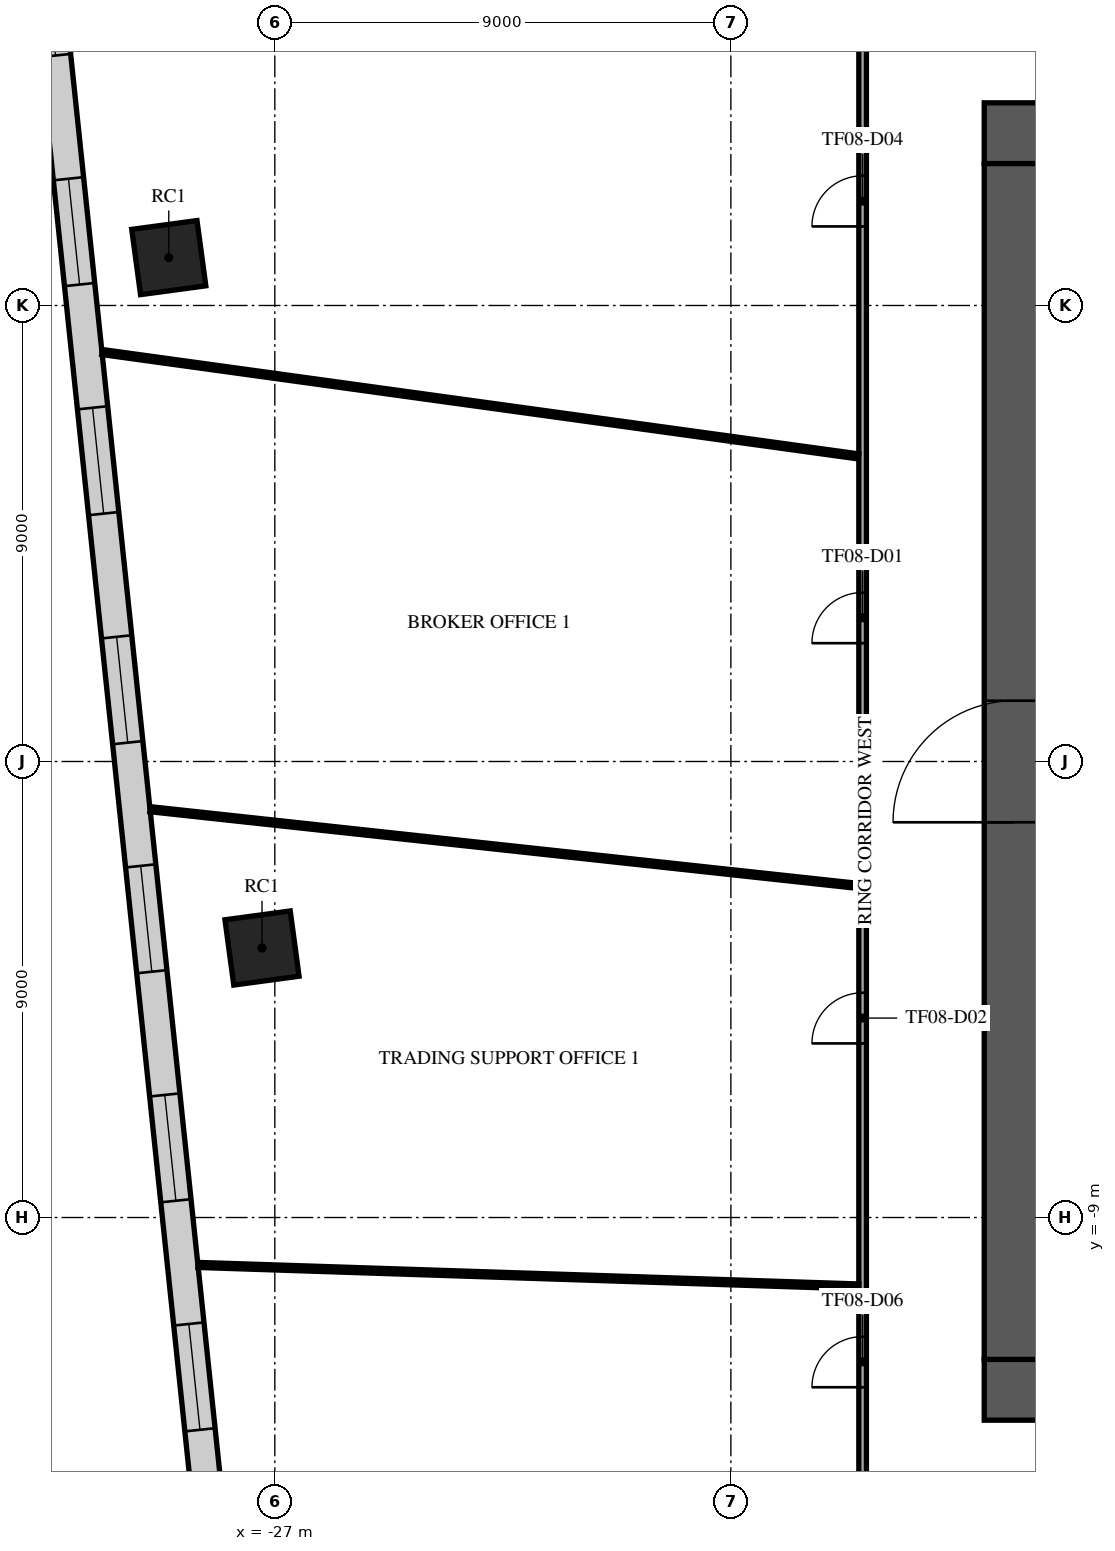
"""IFC4 building model, lengths in metres.
Left out: names, types, materials, properties, quantities, classifications, styles, units other than length and angle.
Written with IfcOpenShell. Run it as: python <this file> out.ifc"""

import sys

from ifc_helpers import new_model, si_unit, direction, frame, frame_2d, origin, origin_2d, place, context, subcontext, project, spatial, rectangle, extrude, element, fill, save


model = new_model("IFC4")
c1 = context("Model", 3, precision=1e-05, world=origin(), true_north=direction((0.0, 1.0)))
c2 = subcontext(c1, "Body", "Model", "MODEL_VIEW")
j1 = project(units=[si_unit("LENGTHUNIT", "METRE"), si_unit("PLANEANGLEUNIT", "RADIAN")], contexts=[c1])
p1 = place(None, origin())
s1 = spatial("IfcSite", under=j1, at=p1, CompositionType="ELEMENT")
p2 = place(p1, origin())
s2 = spatial("IfcBuilding", under=s1, at=p2, CompositionType="ELEMENT")
p3 = place(p2, frame((0.0, 0.0, 36.9)))
s3 = spatial("IfcBuildingStorey", under=s2, at=p3, CompositionType="ELEMENT", Elevation=36.9)
for number, where, z_axis, x_axis in (
    (1, (-29.093, 9.945, 0.0), (0.0, 0.0, 1.0), (0.991, 0.134, 0.0)),
    (2, (-27.253, -3.681, 0.0), (0.0, 0.0, 1.0), (0.991, 0.134, 0.0)),
):
    element("IfcColumn", number, at=place(p3, frame(where, z_axis=z_axis, x_axis=x_axis)), inside=s3, PredefinedType="COLUMN", context=c2, shape_type="SweptSolid", body=[
        extrude(rectangle(XDim=1.3, YDim=1.3, at=origin_2d()), origin(), (0.0, 0.0, 1.0), 4.8),
    ])
p4 = place(p3, frame((-13.0, 12.4, 0.0), z_axis=(0.0, 0.0, 1.0), x_axis=(1.0, 0.0, 0.0)))
e3 = element("IfcWall", 3, at=p4, inside=s3, PredefinedType="SHEAR", context=c2, shape_type="SweptSolid", body=[
    extrude(rectangle(XDim=26.0, YDim=1.2, at=frame_2d((13.0, 0.0))), origin(), (0.0, 0.0, 1.0), 4.35),
])
p5 = place(p4, frame((11.8, 0.0, 0.0)))
e4 = element("IfcOpeningElement", 4, at=p5, cuts=e3, PredefinedType="OPENING", context=c2, shape_type="SweptSolid", body=[
    extrude(rectangle(XDim=2.4, YDim=2.4, at=frame_2d((1.2, 1.2))), frame((0.0, 0.61, 0.0), z_axis=(0.0, -1.0, 0.0), x_axis=(1.0, 0.0, 0.0)), (0.0, 0.0, 1.0), 1.22),
])
p6 = place(p4, frame((22.625, 0.0, 0.0)))
e5 = element("IfcOpeningElement", 5, at=p6, cuts=e3, PredefinedType="OPENING", context=c2, shape_type="SweptSolid", body=[
    extrude(rectangle(XDim=1.2, YDim=2.1, at=frame_2d((0.6, 1.05))), frame((0.0, 0.61, 0.0), z_axis=(0.0, -1.0, 0.0), x_axis=(1.0, 0.0, 0.0)), (0.0, 0.0, 1.0), 1.22),
])
p7 = place(p4, frame((1.6, 0.0, 0.0)))
e6 = element("IfcOpeningElement", 6, at=p7, cuts=e3, PredefinedType="OPENING", context=c2, shape_type="SweptSolid", body=[
    extrude(rectangle(XDim=1.0, YDim=2.1, at=frame_2d((0.5, 1.05))), frame((0.0, 0.61, 0.0), z_axis=(0.0, -1.0, 0.0), x_axis=(1.0, 0.0, 0.0)), (0.0, 0.0, 1.0), 1.22),
])
p8 = place(p3, frame((-13.0, -12.4, 0.0), z_axis=(0.0, 0.0, 1.0), x_axis=(1.0, 0.0, 0.0)))
e7 = element("IfcWall", 7, at=p8, inside=s3, PredefinedType="SHEAR", context=c2, shape_type="SweptSolid", body=[
    extrude(rectangle(XDim=26.0, YDim=1.2, at=frame_2d((13.0, 0.0))), origin(), (0.0, 0.0, 1.0), 4.35),
])
p9 = place(p8, frame((7.9, 0.0, 0.0)))
e8 = element("IfcOpeningElement", 8, at=p9, cuts=e7, PredefinedType="OPENING", context=c2, shape_type="SweptSolid", body=[
    extrude(rectangle(XDim=2.0, YDim=2.1, at=frame_2d((1.0, 1.05))), frame((0.0, 0.61, 0.0), z_axis=(0.0, -1.0, 0.0), x_axis=(1.0, 0.0, 0.0)), (0.0, 0.0, 1.0), 1.22),
])
p10 = place(p8, frame((18.025, 0.0, 0.0)))
e9 = element("IfcOpeningElement", 9, at=p10, cuts=e7, PredefinedType="OPENING", context=c2, shape_type="SweptSolid", body=[
    extrude(rectangle(XDim=1.2, YDim=2.1, at=frame_2d((0.6, 1.05))), frame((0.0, 0.61, 0.0), z_axis=(0.0, -1.0, 0.0), x_axis=(1.0, 0.0, 0.0)), (0.0, 0.0, 1.0), 1.22),
])
p11 = place(p8, frame((2.175, 0.0, 0.0)))
e10 = element("IfcOpeningElement", 10, at=p11, cuts=e7, PredefinedType="OPENING", context=c2, shape_type="SweptSolid", body=[
    extrude(rectangle(XDim=1.2, YDim=2.1, at=frame_2d((0.6, 1.05))), frame((0.0, 0.61, 0.0), z_axis=(0.0, -1.0, 0.0), x_axis=(1.0, 0.0, 0.0)), (0.0, 0.0, 1.0), 1.22),
])
p12 = place(p8, frame((22.625, 0.0, 0.0)))
e11 = element("IfcOpeningElement", 11, at=p12, cuts=e7, PredefinedType="OPENING", context=c2, shape_type="SweptSolid", body=[
    extrude(rectangle(XDim=1.2, YDim=2.1, at=frame_2d((0.6, 1.05))), frame((0.0, 0.61, 0.0), z_axis=(0.0, -1.0, 0.0), x_axis=(1.0, 0.0, 0.0)), (0.0, 0.0, 1.0), 1.22),
])
p13 = place(p3, frame((-12.4, -11.8, 0.0), z_axis=(0.0, 0.0, 1.0), x_axis=(0.0, 1.0, 0.0)))
e12 = element("IfcWall", 12, at=p13, inside=s3, PredefinedType="SHEAR", context=c2, shape_type="SweptSolid", body=[
    extrude(rectangle(XDim=23.6, YDim=1.2, at=frame_2d((11.8, 0.0))), origin(), (0.0, 0.0, 1.0), 4.35),
])
p14 = place(p13, frame((10.6, 0.0, 0.0)))
e13 = element("IfcOpeningElement", 13, at=p14, cuts=e12, PredefinedType="OPENING", context=c2, shape_type="SweptSolid", body=[
    extrude(rectangle(XDim=2.4, YDim=2.4, at=frame_2d((1.2, 1.2))), frame((0.0, 0.61, 0.0), z_axis=(0.0, -1.0, 0.0), x_axis=(1.0, 0.0, 0.0)), (0.0, 0.0, 1.0), 1.22),
])
p15 = place(p3, frame((-32.137, 21.635, 0.0), z_axis=(0.0, 0.0, 1.0), x_axis=(0.104528196591, -0.994521923397, 0.0)))
e14 = element("IfcWall", 14, at=p15, inside=s3, PredefinedType="STANDARD", context=c2, shape_type="SweptSolid", body=[
    extrude(rectangle(XDim=49.751, YDim=0.6, at=frame_2d((24.876, 0.0))), origin(), (0.0, 0.0, 1.0), 4.35),
])
p16 = place(p15, frame((1.161, 0.0, 0.9)))
e15 = element("IfcOpeningElement", 15, at=p16, cuts=e14, PredefinedType="OPENING", context=c2, shape_type="SweptSolid", body=[
    extrude(rectangle(XDim=2.1, YDim=2.7, at=frame_2d((1.05, 1.35))), frame((0.0, 0.31, 0.0), z_axis=(0.0, -1.0, 0.0), x_axis=(1.0, 0.0, 0.0)), (0.0, 0.0, 1.0), 0.62),
])
p17 = place(p15, frame((5.644, 0.0, 0.9)))
e16 = element("IfcOpeningElement", 16, at=p17, cuts=e14, PredefinedType="OPENING", context=c2, shape_type="SweptSolid", body=[
    extrude(rectangle(XDim=2.1, YDim=2.7, at=frame_2d((1.05, 1.35))), frame((0.0, 0.31, 0.0), z_axis=(0.0, -1.0, 0.0), x_axis=(1.0, 0.0, 0.0)), (0.0, 0.0, 1.0), 0.62),
])
p18 = place(p15, frame((10.189, 0.0, 0.9)))
e17 = element("IfcOpeningElement", 17, at=p18, cuts=e14, PredefinedType="OPENING", context=c2, shape_type="SweptSolid", body=[
    extrude(rectangle(XDim=2.1, YDim=2.7, at=frame_2d((1.05, 1.35))), frame((0.0, 0.31, 0.0), z_axis=(0.0, -1.0, 0.0), x_axis=(1.0, 0.0, 0.0)), (0.0, 0.0, 1.0), 0.62),
])
p19 = place(p15, frame((14.735, 0.0, 0.9)))
e18 = element("IfcOpeningElement", 18, at=p19, cuts=e14, PredefinedType="OPENING", context=c2, shape_type="SweptSolid", body=[
    extrude(rectangle(XDim=2.1, YDim=2.7, at=frame_2d((1.05, 1.35))), frame((0.0, 0.31, 0.0), z_axis=(0.0, -1.0, 0.0), x_axis=(1.0, 0.0, 0.0)), (0.0, 0.0, 1.0), 0.62),
])
p20 = place(p15, frame((19.28, 0.0, 0.9)))
e19 = element("IfcOpeningElement", 19, at=p20, cuts=e14, PredefinedType="OPENING", context=c2, shape_type="SweptSolid", body=[
    extrude(rectangle(XDim=2.1, YDim=2.7, at=frame_2d((1.05, 1.35))), frame((0.0, 0.31, 0.0), z_axis=(0.0, -1.0, 0.0), x_axis=(1.0, 0.0, 0.0)), (0.0, 0.0, 1.0), 0.62),
])
p21 = place(p15, frame((23.826, 0.0, 0.9)))
e20 = element("IfcOpeningElement", 20, at=p21, cuts=e14, PredefinedType="OPENING", context=c2, shape_type="SweptSolid", body=[
    extrude(rectangle(XDim=2.1, YDim=2.7, at=frame_2d((1.05, 1.35))), frame((0.0, 0.31, 0.0), z_axis=(0.0, -1.0, 0.0), x_axis=(1.0, 0.0, 0.0)), (0.0, 0.0, 1.0), 0.62),
])
p22 = place(p15, frame((28.371, 0.0, 0.9)))
e21 = element("IfcOpeningElement", 21, at=p22, cuts=e14, PredefinedType="OPENING", context=c2, shape_type="SweptSolid", body=[
    extrude(rectangle(XDim=2.1, YDim=2.7, at=frame_2d((1.05, 1.35))), frame((0.0, 0.31, 0.0), z_axis=(0.0, -1.0, 0.0), x_axis=(1.0, 0.0, 0.0)), (0.0, 0.0, 1.0), 0.62),
])
p23 = place(p15, frame((32.917, 0.0, 0.9)))
e22 = element("IfcOpeningElement", 22, at=p23, cuts=e14, PredefinedType="OPENING", context=c2, shape_type="SweptSolid", body=[
    extrude(rectangle(XDim=2.1, YDim=2.7, at=frame_2d((1.05, 1.35))), frame((0.0, 0.31, 0.0), z_axis=(0.0, -1.0, 0.0), x_axis=(1.0, 0.0, 0.0)), (0.0, 0.0, 1.0), 0.62),
])
p24 = place(p15, frame((37.462, 0.0, 0.9)))
e23 = element("IfcOpeningElement", 23, at=p24, cuts=e14, PredefinedType="OPENING", context=c2, shape_type="SweptSolid", body=[
    extrude(rectangle(XDim=2.1, YDim=2.7, at=frame_2d((1.05, 1.35))), frame((0.0, 0.31, 0.0), z_axis=(0.0, -1.0, 0.0), x_axis=(1.0, 0.0, 0.0)), (0.0, 0.0, 1.0), 0.62),
])
p25 = place(p15, frame((42.008, 0.0, 0.9)))
e24 = element("IfcOpeningElement", 24, at=p25, cuts=e14, PredefinedType="OPENING", context=c2, shape_type="SweptSolid", body=[
    extrude(rectangle(XDim=2.1, YDim=2.7, at=frame_2d((1.05, 1.35))), frame((0.0, 0.31, 0.0), z_axis=(0.0, -1.0, 0.0), x_axis=(1.0, 0.0, 0.0)), (0.0, 0.0, 1.0), 0.62),
])
p26 = place(p15, frame((46.491, 0.0, 0.9)))
e25 = element("IfcOpeningElement", 25, at=p26, cuts=e14, PredefinedType="OPENING", context=c2, shape_type="SweptSolid", body=[
    extrude(rectangle(XDim=2.1, YDim=2.7, at=frame_2d((1.05, 1.35))), frame((0.0, 0.31, 0.0), z_axis=(0.0, -1.0, 0.0), x_axis=(1.0, 0.0, 0.0)), (0.0, 0.0, 1.0), 0.62),
])
p27 = place(p3, frame((-15.4, -15.4, 0.0), z_axis=(0.0, 0.0, 1.0), x_axis=(0.0, 1.0, 0.0)))
e26 = element("IfcWall", 26, at=p27, inside=s3, PredefinedType="PARTITIONING", context=c2, shape_type="SweptSolid", body=[
    extrude(rectangle(XDim=30.8, YDim=0.15, at=frame_2d((15.4, 0.0))), origin(), (0.0, 0.0, 1.0), 3.85),
])
p28 = place(p27, frame((17.735, 0.0, 0.0)))
e27 = element("IfcOpeningElement", 27, at=p28, cuts=e26, PredefinedType="OPENING", context=c2, shape_type="SweptSolid", body=[
    extrude(rectangle(XDim=1.0, YDim=2.1, at=frame_2d((0.5, 1.05))), frame((0.0, 0.085, 0.0), z_axis=(0.0, -1.0, 0.0), x_axis=(1.0, 0.0, 0.0)), (0.0, 0.0, 1.0), 0.17),
])
p29 = place(p27, frame((9.836, 0.0, 0.0)))
e28 = element("IfcOpeningElement", 28, at=p29, cuts=e26, PredefinedType="OPENING", context=c2, shape_type="SweptSolid", body=[
    extrude(rectangle(XDim=1.0, YDim=2.1, at=frame_2d((0.5, 1.05))), frame((0.0, 0.085, 0.0), z_axis=(0.0, -1.0, 0.0), x_axis=(1.0, 0.0, 0.0)), (0.0, 0.0, 1.0), 0.17),
])
p30 = place(p27, frame((25.96, 0.0, 0.0)))
e29 = element("IfcOpeningElement", 29, at=p30, cuts=e26, PredefinedType="OPENING", context=c2, shape_type="SweptSolid", body=[
    extrude(rectangle(XDim=1.0, YDim=2.1, at=frame_2d((0.5, 1.05))), frame((0.0, 0.085, 0.0), z_axis=(0.0, -1.0, 0.0), x_axis=(1.0, 0.0, 0.0)), (0.0, 0.0, 1.0), 0.17),
])
p31 = place(p27, frame((3.05, 0.0, 0.0)))
e30 = element("IfcOpeningElement", 30, at=p31, cuts=e26, PredefinedType="OPENING", context=c2, shape_type="SweptSolid", body=[
    extrude(rectangle(XDim=1.0, YDim=2.1, at=frame_2d((0.5, 1.05))), frame((0.0, 0.085, 0.0), z_axis=(0.0, -1.0, 0.0), x_axis=(1.0, 0.0, 0.0)), (0.0, 0.0, 1.0), 0.17),
])
p32 = place(p3, frame((-30.409, 8.081, 0.0), z_axis=(0.0, 0.0, 1.0), x_axis=(0.990611296102, -0.136708668474, 0.0)))
e31 = element("IfcWall", 31, at=p32, inside=s3, PredefinedType="PARTITIONING", context=c2, shape_type="SweptSolid", body=[
    extrude(rectangle(XDim=15.069, YDim=0.1, at=frame_2d((7.534, 0.0))), origin(), (0.0, 0.0, 1.0), 3.55),
])
p33 = place(p3, frame((-29.461, -0.941, 0.0), z_axis=(0.0, 0.0, 1.0), x_axis=(0.994180492655, -0.107727192598, 0.0)))
e32 = element("IfcWall", 32, at=p33, inside=s3, PredefinedType="PARTITIONING", context=c2, shape_type="SweptSolid", body=[
    extrude(rectangle(XDim=14.062, YDim=0.1, at=frame_2d((7.031, 0.0))), origin(), (0.0, 0.0, 1.0), 3.55),
])
p34 = place(p3, frame((-28.516, -9.936, 0.0), z_axis=(0.0, 0.0, 1.0), x_axis=(0.999467274865, -0.032636888245, 0.0)))
e33 = element("IfcWall", 33, at=p34, inside=s3, PredefinedType="PARTITIONING", context=c2, shape_type="SweptSolid", body=[
    extrude(rectangle(XDim=13.046, YDim=0.1, at=frame_2d((6.523, 0.0))), origin(), (0.0, 0.0, 1.0), 3.55),
])
p35 = place(p14, origin())
e34 = element("IfcDoor", 34, at=p35, inside=s3, OperationType="SINGLE_SWING_LEFT", PredefinedType="DOOR", context=c2, shape_type="SweptSolid", body=[
    extrude(rectangle(XDim=2.4, YDim=2.4, at=frame_2d((1.2, 1.2))), frame((0.0, 0.025, 0.0), z_axis=(0.0, -1.0, 0.0), x_axis=(1.0, 0.0, 0.0)), (0.0, 0.0, 1.0), 0.05),
])
fill(e13, e34)
p36 = place(p17, origin())
e35 = element("IfcWindow", 35, at=p36, inside=s3, PartitioningType="SINGLE_PANEL", PredefinedType="WINDOW", context=c2, shape_type="SweptSolid", body=[
    extrude(rectangle(XDim=2.1, YDim=2.7, at=frame_2d((1.05, 1.35))), frame((0.0, 0.03, 0.0), z_axis=(0.0, -1.0, 0.0), x_axis=(1.0, 0.0, 0.0)), (0.0, 0.0, 1.0), 0.06),
])
fill(e16, e35)
p37 = place(p18, origin())
e36 = element("IfcWindow", 36, at=p37, inside=s3, PartitioningType="SINGLE_PANEL", PredefinedType="WINDOW", context=c2, shape_type="SweptSolid", body=[
    extrude(rectangle(XDim=2.1, YDim=2.7, at=frame_2d((1.05, 1.35))), frame((0.0, 0.03, 0.0), z_axis=(0.0, -1.0, 0.0), x_axis=(1.0, 0.0, 0.0)), (0.0, 0.0, 1.0), 0.06),
])
fill(e17, e36)
p38 = place(p19, origin())
e37 = element("IfcWindow", 37, at=p38, inside=s3, PartitioningType="SINGLE_PANEL", PredefinedType="WINDOW", context=c2, shape_type="SweptSolid", body=[
    extrude(rectangle(XDim=2.1, YDim=2.7, at=frame_2d((1.05, 1.35))), frame((0.0, 0.03, 0.0), z_axis=(0.0, -1.0, 0.0), x_axis=(1.0, 0.0, 0.0)), (0.0, 0.0, 1.0), 0.06),
])
fill(e18, e37)
p39 = place(p20, origin())
e38 = element("IfcWindow", 38, at=p39, inside=s3, PartitioningType="SINGLE_PANEL", PredefinedType="WINDOW", context=c2, shape_type="SweptSolid", body=[
    extrude(rectangle(XDim=2.1, YDim=2.7, at=frame_2d((1.05, 1.35))), frame((0.0, 0.03, 0.0), z_axis=(0.0, -1.0, 0.0), x_axis=(1.0, 0.0, 0.0)), (0.0, 0.0, 1.0), 0.06),
])
fill(e19, e38)
p40 = place(p21, origin())
e39 = element("IfcWindow", 39, at=p40, inside=s3, PartitioningType="SINGLE_PANEL", PredefinedType="WINDOW", context=c2, shape_type="SweptSolid", body=[
    extrude(rectangle(XDim=2.1, YDim=2.7, at=frame_2d((1.05, 1.35))), frame((0.0, 0.03, 0.0), z_axis=(0.0, -1.0, 0.0), x_axis=(1.0, 0.0, 0.0)), (0.0, 0.0, 1.0), 0.06),
])
fill(e20, e39)
p41 = place(p22, origin())
e40 = element("IfcWindow", 40, at=p41, inside=s3, PartitioningType="SINGLE_PANEL", PredefinedType="WINDOW", context=c2, shape_type="SweptSolid", body=[
    extrude(rectangle(XDim=2.1, YDim=2.7, at=frame_2d((1.05, 1.35))), frame((0.0, 0.03, 0.0), z_axis=(0.0, -1.0, 0.0), x_axis=(1.0, 0.0, 0.0)), (0.0, 0.0, 1.0), 0.06),
])
fill(e21, e40)
p42 = place(p23, origin())
e41 = element("IfcWindow", 41, at=p42, inside=s3, PartitioningType="SINGLE_PANEL", PredefinedType="WINDOW", context=c2, shape_type="SweptSolid", body=[
    extrude(rectangle(XDim=2.1, YDim=2.7, at=frame_2d((1.05, 1.35))), frame((0.0, 0.03, 0.0), z_axis=(0.0, -1.0, 0.0), x_axis=(1.0, 0.0, 0.0)), (0.0, 0.0, 1.0), 0.06),
])
fill(e22, e41)
p43 = place(p28, origin())
e42 = element("IfcDoor", 42, at=p43, inside=s3, OperationType="SINGLE_SWING_LEFT", PredefinedType="DOOR", context=c2, shape_type="SweptSolid", body=[
    extrude(rectangle(XDim=1.0, YDim=2.1, at=frame_2d((0.5, 1.05))), frame((0.0, 0.025, 0.0), z_axis=(0.0, -1.0, 0.0), x_axis=(1.0, 0.0, 0.0)), (0.0, 0.0, 1.0), 0.05),
])
fill(e27, e42)
p44 = place(p29, origin())
e43 = element("IfcDoor", 43, at=p44, inside=s3, OperationType="SINGLE_SWING_RIGHT", PredefinedType="DOOR", context=c2, shape_type="SweptSolid", body=[
    extrude(rectangle(XDim=1.0, YDim=2.1, at=frame_2d((0.5, 1.05))), frame((0.0, 0.025, 0.0), z_axis=(0.0, -1.0, 0.0), x_axis=(1.0, 0.0, 0.0)), (0.0, 0.0, 1.0), 0.05),
])
fill(e28, e43)
p45 = place(p30, origin())
e44 = element("IfcDoor", 44, at=p45, inside=s3, OperationType="SINGLE_SWING_LEFT", PredefinedType="DOOR", context=c2, shape_type="SweptSolid", body=[
    extrude(rectangle(XDim=1.0, YDim=2.1, at=frame_2d((0.5, 1.05))), frame((0.0, 0.025, 0.0), z_axis=(0.0, -1.0, 0.0), x_axis=(1.0, 0.0, 0.0)), (0.0, 0.0, 1.0), 0.05),
])
fill(e29, e44)
p46 = place(p31, origin())
e45 = element("IfcDoor", 45, at=p46, inside=s3, OperationType="SINGLE_SWING_LEFT", PredefinedType="DOOR", context=c2, shape_type="SweptSolid", body=[
    extrude(rectangle(XDim=1.0, YDim=2.1, at=frame_2d((0.5, 1.05))), frame((0.0, 0.025, 0.0), z_axis=(0.0, -1.0, 0.0), x_axis=(1.0, 0.0, 0.0)), (0.0, 0.0, 1.0), 0.05),
])
fill(e30, e45)
save(model, sys.argv[1])
